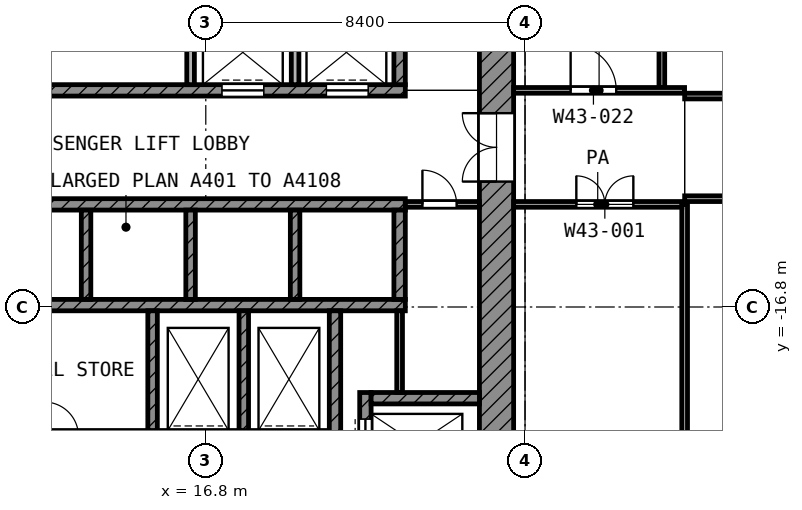
"""IFC4 building model, lengths in metres.
Left out: names, types, materials, properties, quantities, classifications, styles, units other than length and angle.
Written with IfcOpenShell. Run it as: python <this file> out.ifc"""

import sys

from ifc_helpers import new_model, si_unit, direction, frame, frame_2d, origin, place, context, subcontext, project, spatial, rectangle, extrude, element, fill, save


model = new_model("IFC4")
c1 = context("Model", 3, precision=1e-05, world=origin(), true_north=direction((0.0, 1.0)))
c2 = subcontext(c1, "Body", "Model", "MODEL_VIEW")
j1 = project(units=[si_unit("LENGTHUNIT", "METRE"), si_unit("PLANEANGLEUNIT", "RADIAN")], contexts=[c1])
p1 = place(None, origin())
s1 = spatial("IfcSite", under=j1, at=p1, CompositionType="ELEMENT")
p2 = place(p1, origin())
s2 = spatial("IfcBuilding", under=s1, at=p2, CompositionType="ELEMENT")
p3 = place(p2, frame((0.0, 0.0, 208.8)))
s3 = spatial("IfcBuildingStorey", under=s2, at=p3, CompositionType="ELEMENT", Elevation=208.8)
p4 = place(p3, frame((24.45, -24.0, 0.0), z_axis=(0.0, 0.0, 1.0), x_axis=(0.0, 1.0, 0.0)))
e1 = element("IfcWall", 1, at=p4, inside=s3, PredefinedType="SHEAR", context=c2, shape_type="SweptSolid", body=[
    extrude(rectangle(XDim=18.6, YDim=0.9, at=frame_2d((9.3, 0.0))), origin(), (0.0, 0.0, 1.0), 3.7),
])
p5 = place(p4, frame((10.5, 0.0, 0.0)))
e2 = element("IfcOpeningElement", 2, at=p5, cuts=e1, PredefinedType="OPENING", context=c2, shape_type="SweptSolid", body=[
    extrude(rectangle(XDim=1.8, YDim=2.1, at=frame_2d((0.9, 1.05))), frame((0.0, 0.46, 0.0), z_axis=(0.0, -1.0, 0.0), x_axis=(1.0, 0.0, 0.0)), (0.0, 0.0, 1.0), 0.92),
])
p6 = place(p3, frame((5.4, -11.1, 0.0), z_axis=(0.0, 0.0, 1.0), x_axis=(1.0, 0.0, 0.0)))
e3 = element("IfcWall", 3, at=p6, inside=s3, PredefinedType="SHEAR", context=c2, shape_type="SweptSolid", body=[
    extrude(rectangle(XDim=16.65, YDim=0.3, at=frame_2d((8.325, 0.0))), origin(), (0.0, 0.0, 1.0), 3.7),
])
p7 = place(p6, frame((11.825, 0.0, 0.0)))
e4 = element("IfcOpeningElement", 4, at=p7, cuts=e3, PredefinedType="OPENING", context=c2, shape_type="SweptSolid", body=[
    extrude(rectangle(XDim=1.1, YDim=2.1, at=frame_2d((0.55, 1.05))), frame((0.0, 0.16, 0.0), z_axis=(0.0, -1.0, 0.0), x_axis=(1.0, 0.0, 0.0)), (0.0, 0.0, 1.0), 0.32),
])
p8 = place(p6, frame((14.575, 0.0, 0.0)))
e5 = element("IfcOpeningElement", 5, at=p8, cuts=e3, PredefinedType="OPENING", context=c2, shape_type="SweptSolid", body=[
    extrude(rectangle(XDim=1.1, YDim=2.1, at=frame_2d((0.55, 1.05))), frame((0.0, 0.16, 0.0), z_axis=(0.0, -1.0, 0.0), x_axis=(1.0, 0.0, 0.0)), (0.0, 0.0, 1.0), 0.32),
])
p9 = place(p6, frame((0.925, 0.0, 0.0)))
e6 = element("IfcOpeningElement", 6, at=p9, cuts=e3, PredefinedType="OPENING", context=c2, shape_type="SweptSolid", body=[
    extrude(rectangle(XDim=0.9, YDim=2.1, at=frame_2d((0.45, 1.05))), frame((0.0, 0.16, 0.0), z_axis=(0.0, -1.0, 0.0), x_axis=(1.0, 0.0, 0.0)), (0.0, 0.0, 1.0), 0.32),
])
p10 = place(p6, frame((6.425, 0.0, 0.0)))
e7 = element("IfcOpeningElement", 7, at=p10, cuts=e3, PredefinedType="OPENING", context=c2, shape_type="SweptSolid", body=[
    extrude(rectangle(XDim=0.9, YDim=2.1, at=frame_2d((0.45, 1.05))), frame((0.0, 0.16, 0.0), z_axis=(0.0, -1.0, 0.0), x_axis=(1.0, 0.0, 0.0)), (0.0, 0.0, 1.0), 0.32),
])
p11 = place(p3, frame((5.4, -14.1, 0.0), z_axis=(0.0, 0.0, 1.0), x_axis=(1.0, 0.0, 0.0)))
e8 = element("IfcWall", 8, at=p11, inside=s3, PredefinedType="SHEAR", context=c2, shape_type="SweptSolid", body=[
    extrude(rectangle(XDim=16.65, YDim=0.3, at=frame_2d((8.325, 0.0))), origin(), (0.0, 0.0, 1.0), 3.7),
])
p12 = place(p11, frame((0.825, 0.0, 0.0)))
e9 = element("IfcOpeningElement", 9, at=p12, cuts=e8, PredefinedType="OPENING", context=c2, shape_type="SweptSolid", body=[
    extrude(rectangle(XDim=1.1, YDim=2.1, at=frame_2d((0.55, 1.05))), frame((0.0, 0.16, 0.0), z_axis=(0.0, -1.0, 0.0), x_axis=(1.0, 0.0, 0.0)), (0.0, 0.0, 1.0), 0.32),
])
p13 = place(p11, frame((3.575, 0.0, 0.0)))
e10 = element("IfcOpeningElement", 10, at=p13, cuts=e8, PredefinedType="OPENING", context=c2, shape_type="SweptSolid", body=[
    extrude(rectangle(XDim=1.1, YDim=2.1, at=frame_2d((0.55, 1.05))), frame((0.0, 0.16, 0.0), z_axis=(0.0, -1.0, 0.0), x_axis=(1.0, 0.0, 0.0)), (0.0, 0.0, 1.0), 0.32),
])
p14 = place(p3, frame((5.4, -16.75, 0.0), z_axis=(0.0, 0.0, 1.0), x_axis=(1.0, 0.0, 0.0)))
e11 = element("IfcWall", 11, at=p14, inside=s3, PredefinedType="SHEAR", context=c2, shape_type="SweptSolid", body=[
    extrude(rectangle(XDim=16.65, YDim=0.3, at=frame_2d((8.325, 0.0))), origin(), (0.0, 0.0, 1.0), 3.7),
])
p15 = place(p3, frame((5.4, -20.2, 0.0), z_axis=(0.0, 0.0, 1.0), x_axis=(1.0, 0.0, 0.0)))
e12 = element("IfcWall", 12, at=p15, inside=s3, PredefinedType="SHEAR", context=c2, shape_type="SweptSolid", body=[
    extrude(rectangle(XDim=14.65, YDim=0.3, at=frame_2d((7.325, 0.0))), origin(), (0.0, 0.0, 1.0), 3.7),
])
p16 = place(p15, frame((10.55, 0.0, 0.0)))
e13 = element("IfcOpeningElement", 13, at=p16, cuts=e12, PredefinedType="OPENING", context=c2, shape_type="SweptSolid", body=[
    extrude(rectangle(XDim=1.3, YDim=2.1, at=frame_2d((0.65, 1.05))), frame((0.0, 0.16, 0.0), z_axis=(0.0, -1.0, 0.0), x_axis=(1.0, 0.0, 0.0)), (0.0, 0.0, 1.0), 0.32),
])
p17 = place(p15, frame((12.95, 0.0, 0.0)))
e14 = element("IfcOpeningElement", 14, at=p17, cuts=e12, PredefinedType="OPENING", context=c2, shape_type="SweptSolid", body=[
    extrude(rectangle(XDim=1.3, YDim=2.1, at=frame_2d((0.65, 1.05))), frame((0.0, 0.16, 0.0), z_axis=(0.0, -1.0, 0.0), x_axis=(1.0, 0.0, 0.0)), (0.0, 0.0, 1.0), 0.32),
])
p18 = place(p15, frame((0.55, 0.0, 0.0)))
e15 = element("IfcOpeningElement", 15, at=p18, cuts=e12, PredefinedType="OPENING", context=c2, shape_type="SweptSolid", body=[
    extrude(rectangle(XDim=1.3, YDim=2.1, at=frame_2d((0.65, 1.05))), frame((0.0, 0.16, 0.0), z_axis=(0.0, -1.0, 0.0), x_axis=(1.0, 0.0, 0.0)), (0.0, 0.0, 1.0), 0.32),
])
p19 = place(p15, frame((2.95, 0.0, 0.0)))
e16 = element("IfcOpeningElement", 16, at=p19, cuts=e12, PredefinedType="OPENING", context=c2, shape_type="SweptSolid", body=[
    extrude(rectangle(XDim=1.3, YDim=2.1, at=frame_2d((0.65, 1.05))), frame((0.0, 0.16, 0.0), z_axis=(0.0, -1.0, 0.0), x_axis=(1.0, 0.0, 0.0)), (0.0, 0.0, 1.0), 0.32),
])
p20 = place(p15, frame((7.15, 0.0, 0.0)))
e17 = element("IfcOpeningElement", 17, at=p20, cuts=e12, PredefinedType="OPENING", context=c2, shape_type="SweptSolid", body=[
    extrude(rectangle(XDim=0.9, YDim=2.1, at=frame_2d((0.45, 1.05))), frame((0.0, 0.16, 0.0), z_axis=(0.0, -1.0, 0.0), x_axis=(1.0, 0.0, 0.0)), (0.0, 0.0, 1.0), 0.32),
])
p21 = place(p3, frame((20.2, -20.35, 0.0), z_axis=(0.0, 0.0, 1.0), x_axis=(0.0, 1.0, 0.0)))
e18 = element("IfcWall", 18, at=p21, inside=s3, PredefinedType="SHEAR", context=c2, shape_type="SweptSolid", body=[
    extrude(rectangle(XDim=3.45, YDim=0.3, at=frame_2d((1.725, 0.0))), origin(), (0.0, 0.0, 1.0), 3.7),
])
p22 = place(p3, frame((21.9, -10.95, 0.0), z_axis=(0.0, 0.0, 1.0), x_axis=(0.0, 1.0, 0.0)))
e19 = element("IfcWall", 19, at=p22, inside=s3, PredefinedType="SHEAR", context=c2, shape_type="SweptSolid", body=[
    extrude(rectangle(XDim=2.35, YDim=0.3, at=frame_2d((1.175, 0.0))), origin(), (0.0, 0.0, 1.0), 3.7),
])
p23 = place(p3, frame((21.9, -16.6, 0.0), z_axis=(0.0, 0.0, 1.0), x_axis=(0.0, 1.0, 0.0)))
e20 = element("IfcWall", 20, at=p23, inside=s3, PredefinedType="SHEAR", context=c2, shape_type="SweptSolid", body=[
    extrude(rectangle(XDim=2.35, YDim=0.3, at=frame_2d((1.175, 0.0))), origin(), (0.0, 0.0, 1.0), 3.7),
])
p24 = place(p3, frame((21.15, -19.2, 0.0), z_axis=(0.0, 0.0, 1.0), x_axis=(1.0, 0.0, 0.0)))
e21 = element("IfcWall", 21, at=p24, inside=s3, PredefinedType="SHEAR", context=c2, shape_type="SweptSolid", body=[
    extrude(rectangle(XDim=2.85, YDim=0.3, at=frame_2d((1.425, 0.0))), origin(), (0.0, 0.0, 1.0), 3.7),
])
p25 = place(p3, frame((21.0, -24.0, 0.0), z_axis=(0.0, 0.0, 1.0), x_axis=(0.0, 1.0, 0.0)))
e22 = element("IfcWall", 22, at=p25, inside=s3, PredefinedType="SHEAR", context=c2, shape_type="SweptSolid", body=[
    extrude(rectangle(XDim=4.95, YDim=0.3, at=frame_2d((2.475, 0.0))), origin(), (0.0, 0.0, 1.0), 3.7),
])
p26 = place(p25, frame((2.95, 0.0, 0.0)))
e23 = element("IfcOpeningElement", 23, at=p26, cuts=e22, PredefinedType="OPENING", context=c2, shape_type="SweptSolid", body=[
    extrude(rectangle(XDim=1.3, YDim=2.1, at=frame_2d((0.65, 1.05))), frame((0.0, 0.16, 0.0), z_axis=(0.0, -1.0, 0.0), x_axis=(1.0, 0.0, 0.0)), (0.0, 0.0, 1.0), 0.32),
])
p27 = place(p25, frame((0.55, 0.0, 0.0)))
e24 = element("IfcOpeningElement", 24, at=p27, cuts=e22, PredefinedType="OPENING", context=c2, shape_type="SweptSolid", body=[
    extrude(rectangle(XDim=1.3, YDim=2.1, at=frame_2d((0.65, 1.05))), frame((0.0, 0.16, 0.0), z_axis=(0.0, -1.0, 0.0), x_axis=(1.0, 0.0, 0.0)), (0.0, 0.0, 1.0), 0.32),
])
for number, where, z_axis, x_axis in (
    (25, (15.4, -20.05, 0.0), (0.0, 0.0, 1.0), (0.0, 1.0, 0.0)),
    (26, (17.8, -20.05, 0.0), (0.0, 0.0, 1.0), (0.0, 1.0, 0.0)),
):
    element("IfcWall", number, at=place(p3, frame(where, z_axis=z_axis, x_axis=x_axis)), inside=s3, PredefinedType="SHEAR", context=c2, shape_type="SweptSolid", body=[
        extrude(rectangle(XDim=3.15, YDim=0.25, at=frame_2d((1.575, 0.0))), origin(), (0.0, 0.0, 1.0), 3.7),
    ])
for number, where, z_axis, x_axis in (
    (27, (16.4, -10.95, 0.0), (0.0, 0.0, 1.0), (0.0, 1.0, 0.0)),
    (28, (19.15, -10.95, 0.0), (0.0, 0.0, 1.0), (0.0, 1.0, 0.0)),
):
    element("IfcWall", number, at=place(p3, frame(where, z_axis=z_axis, x_axis=x_axis)), inside=s3, PredefinedType="PARTITIONING", context=c2, shape_type="SweptSolid", body=[
        extrude(rectangle(XDim=2.35, YDim=0.2, at=frame_2d((1.175, 0.0))), origin(), (0.0, 0.0, 1.0), 3.7),
    ])
for number, where, z_axis, x_axis in (
    (29, (13.65, -16.6, 0.0), (0.0, 0.0, 1.0), (0.0, 1.0, 0.0)),
    (30, (16.4, -16.6, 0.0), (0.0, 0.0, 1.0), (0.0, 1.0, 0.0)),
    (31, (19.15, -16.6, 0.0), (0.0, 0.0, 1.0), (0.0, 1.0, 0.0)),
):
    element("IfcWall", number, at=place(p3, frame(where, z_axis=z_axis, x_axis=x_axis)), inside=s3, PredefinedType="SHEAR", context=c2, shape_type="SweptSolid", body=[
        extrude(rectangle(XDim=2.35, YDim=0.25, at=frame_2d((1.175, 0.0))), origin(), (0.0, 0.0, 1.0), 3.7),
    ])
p28 = place(p3, frame((21.9, -19.05, 0.0), z_axis=(0.0, 0.0, 1.0), x_axis=(0.0, 1.0, 0.0)))
e32 = element("IfcWall", 32, at=p28, inside=s3, PredefinedType="PARTITIONING", context=c2, shape_type="SweptSolid", body=[
    extrude(rectangle(XDim=2.15, YDim=0.15, at=frame_2d((1.075, 0.0))), origin(), (0.0, 0.0, 1.0), 3.7),
])
p29 = place(p3, frame((22.05, -14.1, 0.0), z_axis=(0.0, 0.0, 1.0), x_axis=(1.0, 0.0, 0.0)))
e33 = element("IfcWall", 33, at=p29, inside=s3, PredefinedType="PARTITIONING", context=c2, shape_type="SweptSolid", body=[
    extrude(rectangle(XDim=1.95, YDim=0.15, at=frame_2d((0.975, 0.0))), origin(), (0.0, 0.0, 1.0), 3.7),
])
p30 = place(p29, frame((0.45, 0.0, 0.0)))
e34 = element("IfcOpeningElement", 34, at=p30, cuts=e33, PredefinedType="OPENING", context=c2, shape_type="SweptSolid", body=[
    extrude(rectangle(XDim=0.9, YDim=2.1, at=frame_2d((0.45, 1.05))), frame((0.0, 0.085, 0.0), z_axis=(0.0, -1.0, 0.0), x_axis=(1.0, 0.0, 0.0)), (0.0, 0.0, 1.0), 0.17),
])
p31 = place(p3, frame((24.9, -14.1, 0.0), z_axis=(0.0, 0.0, 1.0), x_axis=(1.0, 0.0, 0.0)))
e35 = element("IfcWall", 35, at=p31, inside=s3, PredefinedType="PARTITIONING", context=c2, shape_type="SweptSolid", body=[
    extrude(rectangle(XDim=4.425, YDim=0.15, at=frame_2d((2.212, 0.0))), origin(), (0.0, 0.0, 1.0), 3.7),
])
p32 = place(p31, frame((1.65, 0.0, 0.0)))
e36 = element("IfcOpeningElement", 36, at=p32, cuts=e35, PredefinedType="OPENING", context=c2, shape_type="SweptSolid", body=[
    extrude(rectangle(XDim=1.5, YDim=2.1, at=frame_2d((0.75, 1.05))), frame((0.0, 0.085, 0.0), z_axis=(0.0, -1.0, 0.0), x_axis=(1.0, 0.0, 0.0)), (0.0, 0.0, 1.0), 0.17),
])
p33 = place(p3, frame((29.4, -13.95, 0.0), z_axis=(0.0, 0.0, 1.0), x_axis=(1.0, 0.0, 0.0)))
e37 = element("IfcWall", 37, at=p33, inside=s3, PredefinedType="PARTITIONING", context=c2, shape_type="SweptSolid", body=[
    extrude(rectangle(XDim=37.72, YDim=0.15, at=frame_2d((18.86, 0.0))), origin(), (0.0, 0.0, 1.0), 3.7),
])
p34 = place(p33, frame((1.6, 0.0, 0.0)))
e38 = element("IfcOpeningElement", 38, at=p34, cuts=e37, PredefinedType="OPENING", context=c2, shape_type="SweptSolid", body=[
    extrude(rectangle(XDim=1.0, YDim=2.1, at=frame_2d((0.5, 1.05))), frame((0.0, 0.085, 0.0), z_axis=(0.0, -1.0, 0.0), x_axis=(1.0, 0.0, 0.0)), (0.0, 0.0, 1.0), 0.17),
])
p35 = place(p33, frame((6.0, 0.0, 0.0)))
e39 = element("IfcOpeningElement", 39, at=p35, cuts=e37, PredefinedType="OPENING", context=c2, shape_type="SweptSolid", body=[
    extrude(rectangle(XDim=1.2, YDim=2.1, at=frame_2d((0.6, 1.05))), frame((0.0, 0.085, 0.0), z_axis=(0.0, -1.0, 0.0), x_axis=(1.0, 0.0, 0.0)), (0.0, 0.0, 1.0), 0.17),
])
p36 = place(p33, frame((12.975, 0.0, 0.0)))
e40 = element("IfcOpeningElement", 40, at=p36, cuts=e37, PredefinedType="OPENING", context=c2, shape_type="SweptSolid", body=[
    extrude(rectangle(XDim=1.2, YDim=2.1, at=frame_2d((0.6, 1.05))), frame((0.0, 0.085, 0.0), z_axis=(0.0, -1.0, 0.0), x_axis=(1.0, 0.0, 0.0)), (0.0, 0.0, 1.0), 0.17),
])
p37 = place(p33, frame((11.45, 0.0, 0.0)))
e41 = element("IfcOpeningElement", 41, at=p37, cuts=e37, PredefinedType="OPENING", context=c2, shape_type="SweptSolid", body=[
    extrude(rectangle(XDim=1.2, YDim=2.1, at=frame_2d((0.6, 1.05))), frame((0.0, 0.085, 0.0), z_axis=(0.0, -1.0, 0.0), x_axis=(1.0, 0.0, 0.0)), (0.0, 0.0, 1.0), 0.17),
])
p38 = place(p33, frame((14.85, 0.0, 0.0)))
e42 = element("IfcOpeningElement", 42, at=p38, cuts=e37, PredefinedType="OPENING", context=c2, shape_type="SweptSolid", body=[
    extrude(rectangle(XDim=1.2, YDim=2.1, at=frame_2d((0.6, 1.05))), frame((0.0, 0.085, 0.0), z_axis=(0.0, -1.0, 0.0), x_axis=(1.0, 0.0, 0.0)), (0.0, 0.0, 1.0), 0.17),
])
p39 = place(p33, frame((21.6, 0.0, 0.0)))
e43 = element("IfcOpeningElement", 43, at=p39, cuts=e37, PredefinedType="OPENING", context=c2, shape_type="SweptSolid", body=[
    extrude(rectangle(XDim=1.2, YDim=2.1, at=frame_2d((0.6, 1.05))), frame((0.0, 0.085, 0.0), z_axis=(0.0, -1.0, 0.0), x_axis=(1.0, 0.0, 0.0)), (0.0, 0.0, 1.0), 0.17),
])
p40 = place(p33, frame((20.1, 0.0, 0.0)))
e44 = element("IfcOpeningElement", 44, at=p40, cuts=e37, PredefinedType="OPENING", context=c2, shape_type="SweptSolid", body=[
    extrude(rectangle(XDim=1.2, YDim=2.1, at=frame_2d((0.6, 1.05))), frame((0.0, 0.085, 0.0), z_axis=(0.0, -1.0, 0.0), x_axis=(1.0, 0.0, 0.0)), (0.0, 0.0, 1.0), 0.17),
])
p41 = place(p33, frame((18.85, 0.0, 0.0)))
e45 = element("IfcOpeningElement", 45, at=p41, cuts=e37, PredefinedType="OPENING", context=c2, shape_type="SweptSolid", body=[
    extrude(rectangle(XDim=0.9, YDim=2.1, at=frame_2d((0.45, 1.05))), frame((0.0, 0.085, 0.0), z_axis=(0.0, -1.0, 0.0), x_axis=(1.0, 0.0, 0.0)), (0.0, 0.0, 1.0), 0.17),
])
p42 = place(p33, frame((23.85, 0.0, 0.0)))
e46 = element("IfcOpeningElement", 46, at=p42, cuts=e37, PredefinedType="OPENING", context=c2, shape_type="SweptSolid", body=[
    extrude(rectangle(XDim=1.2, YDim=2.1, at=frame_2d((0.6, 1.05))), frame((0.0, 0.085, 0.0), z_axis=(0.0, -1.0, 0.0), x_axis=(1.0, 0.0, 0.0)), (0.0, 0.0, 1.0), 0.17),
])
p43 = place(p33, frame((29.475, 0.0, 0.0)))
e47 = element("IfcOpeningElement", 47, at=p43, cuts=e37, PredefinedType="OPENING", context=c2, shape_type="SweptSolid", body=[
    extrude(rectangle(XDim=1.2, YDim=2.1, at=frame_2d((0.6, 1.05))), frame((0.0, 0.085, 0.0), z_axis=(0.0, -1.0, 0.0), x_axis=(1.0, 0.0, 0.0)), (0.0, 0.0, 1.0), 0.17),
])
p44 = place(p33, frame((27.95, 0.0, 0.0)))
e48 = element("IfcOpeningElement", 48, at=p44, cuts=e37, PredefinedType="OPENING", context=c2, shape_type="SweptSolid", body=[
    extrude(rectangle(XDim=1.2, YDim=2.1, at=frame_2d((0.6, 1.05))), frame((0.0, 0.085, 0.0), z_axis=(0.0, -1.0, 0.0), x_axis=(1.0, 0.0, 0.0)), (0.0, 0.0, 1.0), 0.17),
])
p45 = place(p33, frame((31.35, 0.0, 0.0)))
e49 = element("IfcOpeningElement", 49, at=p45, cuts=e37, PredefinedType="OPENING", context=c2, shape_type="SweptSolid", body=[
    extrude(rectangle(XDim=1.2, YDim=2.1, at=frame_2d((0.6, 1.05))), frame((0.0, 0.085, 0.0), z_axis=(0.0, -1.0, 0.0), x_axis=(1.0, 0.0, 0.0)), (0.0, 0.0, 1.0), 0.17),
])
p46 = place(p33, frame((34.9, 0.0, 0.0)))
e50 = element("IfcOpeningElement", 50, at=p46, cuts=e37, PredefinedType="OPENING", context=c2, shape_type="SweptSolid", body=[
    extrude(rectangle(XDim=1.0, YDim=2.1, at=frame_2d((0.5, 1.05))), frame((0.0, 0.085, 0.0), z_axis=(0.0, -1.0, 0.0), x_axis=(1.0, 0.0, 0.0)), (0.0, 0.0, 1.0), 0.17),
])
p47 = place(p3, frame((29.4, -11.25, 0.0), z_axis=(0.0, 0.0, 1.0), x_axis=(1.0, 0.0, 0.0)))
e51 = element("IfcWall", 51, at=p47, inside=s3, PredefinedType="PARTITIONING", context=c2, shape_type="SweptSolid", body=[
    extrude(rectangle(XDim=10.782, YDim=0.15, at=frame_2d((5.391, 0.0))), origin(), (0.0, 0.0, 1.0), 3.7),
])
p48 = place(p47, frame((1.6, 0.0, 0.0)))
e52 = element("IfcOpeningElement", 52, at=p48, cuts=e51, PredefinedType="OPENING", context=c2, shape_type="SweptSolid", body=[
    extrude(rectangle(XDim=1.0, YDim=2.1, at=frame_2d((0.5, 1.05))), frame((0.0, 0.085, 0.0), z_axis=(0.0, -1.0, 0.0), x_axis=(1.0, 0.0, 0.0)), (0.0, 0.0, 1.0), 0.17),
])
p49 = place(p47, frame((4.8, 0.0, 0.0)))
e53 = element("IfcOpeningElement", 53, at=p49, cuts=e51, PredefinedType="OPENING", context=c2, shape_type="SweptSolid", body=[
    extrude(rectangle(XDim=0.9, YDim=2.1, at=frame_2d((0.45, 1.05))), frame((0.0, 0.085, 0.0), z_axis=(0.0, -1.0, 0.0), x_axis=(1.0, 0.0, 0.0)), (0.0, 0.0, 1.0), 0.17),
])
p50 = place(p47, frame((6.85, 0.0, 0.0)))
e54 = element("IfcOpeningElement", 54, at=p50, cuts=e51, PredefinedType="OPENING", context=c2, shape_type="SweptSolid", body=[
    extrude(rectangle(XDim=1.0, YDim=2.1, at=frame_2d((0.5, 1.05))), frame((0.0, 0.085, 0.0), z_axis=(0.0, -1.0, 0.0), x_axis=(1.0, 0.0, 0.0)), (0.0, 0.0, 1.0), 0.17),
])
p51 = place(p3, frame((24.9, -11.1, 0.0), z_axis=(0.0, 0.0, 1.0), x_axis=(1.0, 0.0, 0.0)))
e55 = element("IfcWall", 55, at=p51, inside=s3, PredefinedType="PARTITIONING", context=c2, shape_type="SweptSolid", body=[
    extrude(rectangle(XDim=4.498, YDim=0.15, at=frame_2d((2.249, 0.0))), origin(), (0.0, 0.0, 1.0), 3.7),
])
p52 = place(p51, frame((1.5, 0.0, 0.0)))
e56 = element("IfcOpeningElement", 56, at=p52, cuts=e55, PredefinedType="OPENING", context=c2, shape_type="SweptSolid", body=[
    extrude(rectangle(XDim=1.2, YDim=2.1, at=frame_2d((0.6, 1.05))), frame((0.0, 0.085, 0.0), z_axis=(0.0, -1.0, 0.0), x_axis=(1.0, 0.0, 0.0)), (0.0, 0.0, 1.0), 0.17),
])
p53 = place(p3, frame((28.8, -11.025, 0.0), z_axis=(0.0, 0.0, 1.0), x_axis=(0.0, 1.0, 0.0)))
e57 = element("IfcWall", 57, at=p53, inside=s3, PredefinedType="PARTITIONING", context=c2, shape_type="SweptSolid", body=[
    extrude(rectangle(XDim=10.945, YDim=0.15, at=frame_2d((5.472, 0.0))), origin(), (0.0, 0.0, 1.0), 3.7),
])
p54 = place(p3, frame((29.4, -31.198, 0.0), z_axis=(0.0, 0.0, 1.0), x_axis=(0.0, 1.0, 0.0)))
e58 = element("IfcWall", 58, at=p54, inside=s3, PredefinedType="PARTITIONING", context=c2, shape_type="SweptSolid", body=[
    extrude(rectangle(XDim=17.098, YDim=0.15, at=frame_2d((8.549, 0.0))), origin(), (0.0, 0.0, 1.0), 3.7),
])
p55 = place(p7, origin())
e59 = element("IfcDoor", 59, at=p55, inside=s3, OperationType="DOUBLE_DOOR_SLIDING", PredefinedType="DOOR", context=c2, shape_type="SweptSolid", body=[
    extrude(rectangle(XDim=1.1, YDim=2.1, at=frame_2d((0.55, 1.05))), frame((0.0, 0.025, 0.0), z_axis=(0.0, -1.0, 0.0), x_axis=(1.0, 0.0, 0.0)), (0.0, 0.0, 1.0), 0.05),
])
fill(e4, e59)
p56 = place(p8, origin())
e60 = element("IfcDoor", 60, at=p56, inside=s3, OperationType="DOUBLE_DOOR_SLIDING", PredefinedType="DOOR", context=c2, shape_type="SweptSolid", body=[
    extrude(rectangle(XDim=1.1, YDim=2.1, at=frame_2d((0.55, 1.05))), frame((0.0, 0.025, 0.0), z_axis=(0.0, -1.0, 0.0), x_axis=(1.0, 0.0, 0.0)), (0.0, 0.0, 1.0), 0.05),
])
fill(e5, e60)
p57 = place(p26, origin())
e61 = element("IfcDoor", 61, at=p57, inside=s3, OperationType="DOUBLE_DOOR_SLIDING", PredefinedType="DOOR", context=c2, shape_type="SweptSolid", body=[
    extrude(rectangle(XDim=1.3, YDim=2.1, at=frame_2d((0.65, 1.05))), frame((0.0, 0.025, 0.0), z_axis=(0.0, -1.0, 0.0), x_axis=(1.0, 0.0, 0.0)), (0.0, 0.0, 1.0), 0.05),
])
fill(e23, e61)
p58 = place(p5, origin())
e62 = element("IfcDoor", 62, at=p58, inside=s3, OperationType="DOUBLE_DOOR_SINGLE_SWING", PredefinedType="DOOR", context=c2, shape_type="SweptSolid", body=[
    extrude(rectangle(XDim=1.8, YDim=2.1, at=frame_2d((0.9, 1.05))), frame((0.0, 0.025, 0.0), z_axis=(0.0, -1.0, 0.0), x_axis=(1.0, 0.0, 0.0)), (0.0, 0.0, 1.0), 0.05),
])
fill(e2, e62)
p59 = place(p30, origin())
e63 = element("IfcDoor", 63, at=p59, inside=s3, OperationType="SINGLE_SWING_LEFT", PredefinedType="DOOR", context=c2, shape_type="SweptSolid", body=[
    extrude(rectangle(XDim=0.9, YDim=2.1, at=frame_2d((0.45, 1.05))), frame((0.0, 0.025, 0.0), z_axis=(0.0, -1.0, 0.0), x_axis=(1.0, 0.0, 0.0)), (0.0, 0.0, 1.0), 0.05),
])
fill(e34, e63)
p60 = place(p32, origin())
e64 = element("IfcDoor", 64, at=p60, inside=s3, OperationType="DOUBLE_DOOR_SINGLE_SWING", PredefinedType="DOOR", context=c2, shape_type="SweptSolid", body=[
    extrude(rectangle(XDim=1.5, YDim=2.1, at=frame_2d((0.75, 1.05))), frame((0.0, 0.025, 0.0), z_axis=(0.0, -1.0, 0.0), x_axis=(1.0, 0.0, 0.0)), (0.0, 0.0, 1.0), 0.05),
])
fill(e36, e64)
p61 = place(p52, origin())
e65 = element("IfcDoor", 65, at=p61, inside=s3, OperationType="SINGLE_SWING_LEFT", PredefinedType="DOOR", context=c2, shape_type="SweptSolid", body=[
    extrude(rectangle(XDim=1.2, YDim=2.1, at=frame_2d((0.6, 1.05))), frame((0.0, 0.025, 0.0), z_axis=(0.0, -1.0, 0.0), x_axis=(1.0, 0.0, 0.0)), (0.0, 0.0, 1.0), 0.05),
])
fill(e56, e65)
save(model, sys.argv[1])
